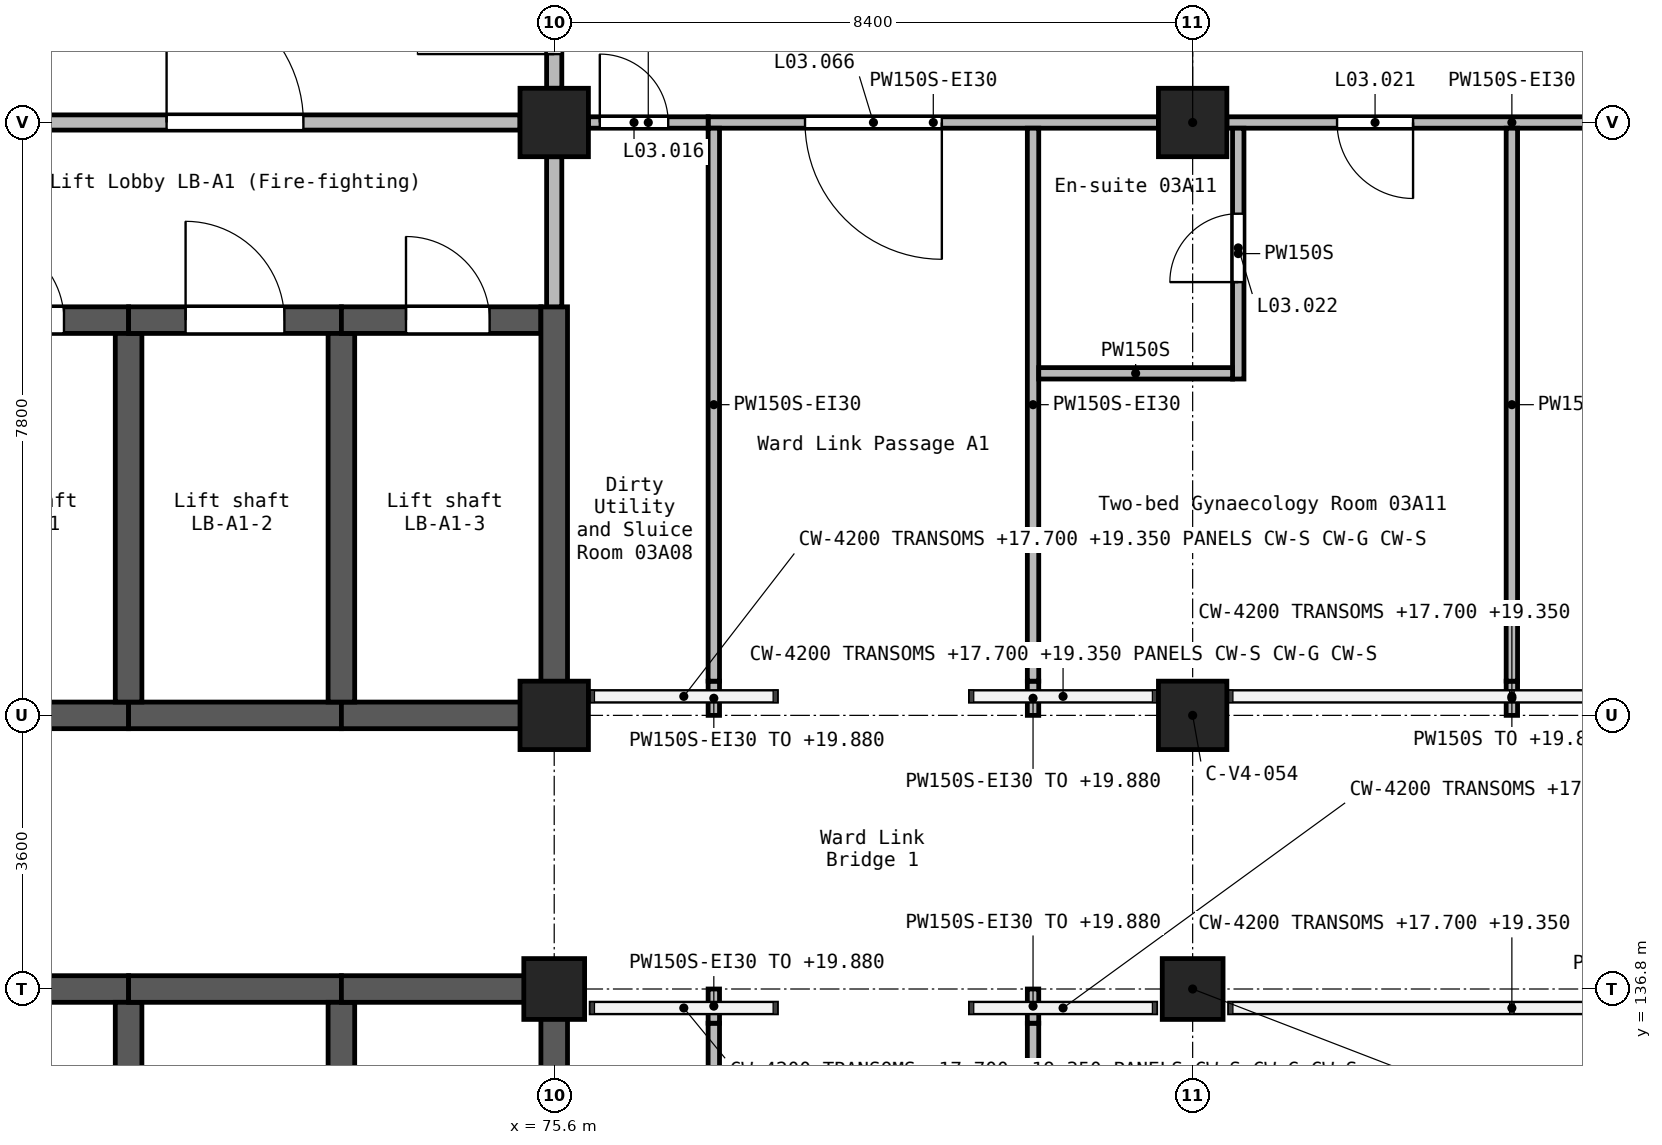
"""IFC4 building model, lengths in metres.
Left out: names, types, materials, properties, quantities, classifications, styles, units other than length and angle.
Written with IfcOpenShell. Run it as: python <this file> out.ifc"""

import sys

from ifc_helpers import new_model, si_unit, direction, frame, frame_2d, origin, origin_2d, place, context, subcontext, project, spatial, rectangle, extrude, element, fill, save


model = new_model("IFC4")
c1 = context("Model", 3, precision=1e-05, world=origin(), true_north=direction((0.0, 1.0)))
c2 = subcontext(c1, "Body", "Model", "MODEL_VIEW")
j1 = project(units=[si_unit("LENGTHUNIT", "METRE"), si_unit("PLANEANGLEUNIT", "RADIAN")], contexts=[c1])
p1 = place(None, origin())
s1 = spatial("IfcSite", under=j1, at=p1, CompositionType="ELEMENT")
p2 = place(p1, origin())
s2 = spatial("IfcBuilding", under=s1, at=p2, CompositionType="ELEMENT")
p3 = place(p2, frame((0.0, 0.0, 16.8)))
s3 = spatial("IfcBuildingStorey", under=s2, at=p3, CompositionType="ELEMENT", Elevation=16.8)
p4 = place(p3, frame((75.6, 136.8, 0.0), z_axis=(0.0, 0.0, 1.0), x_axis=(1.0, 0.0, 0.0)))
e1 = element("IfcColumn", 1, at=p4, inside=s3, PredefinedType="COLUMN", context=c2, shape_type="SweptSolid", body=[
    extrude(rectangle(XDim=0.8, YDim=0.8, at=origin_2d()), origin(), (0.0, 0.0, 1.0), 4.2),
])
for number, where, z_axis, x_axis in (
    (2, (75.6, 140.4, 0.0), (0.0, 0.0, 1.0), (1.0, 0.0, 0.0)),
    (3, (75.6, 148.2, 0.0), (0.0, 0.0, 1.0), (1.0, 0.0, 0.0)),
):
    element("IfcColumn", number, at=place(p3, frame(where, z_axis=z_axis, x_axis=x_axis)), inside=s3, PredefinedType="COLUMN", context=c2, shape_type="SweptSolid", body=[
        extrude(rectangle(XDim=0.9, YDim=0.9, at=origin_2d()), origin(), (0.0, 0.0, 1.0), 4.2),
    ])
p5 = place(p3, frame((84.0, 136.8, 0.0), z_axis=(0.0, 0.0, 1.0), x_axis=(1.0, 0.0, 0.0)))
e4 = element("IfcColumn", 4, at=p5, inside=s3, PredefinedType="COLUMN", context=c2, shape_type="SweptSolid", body=[
    extrude(rectangle(XDim=0.8, YDim=0.8, at=origin_2d()), origin(), (0.0, 0.0, 1.0), 4.2),
])
for number, where, z_axis, x_axis in (
    (5, (84.0, 140.4, 0.0), (0.0, 0.0, 1.0), (1.0, 0.0, 0.0)),
    (6, (84.0, 148.2, 0.0), (0.0, 0.0, 1.0), (1.0, 0.0, 0.0)),
):
    element("IfcColumn", number, at=place(p3, frame(where, z_axis=z_axis, x_axis=x_axis)), inside=s3, PredefinedType="COLUMN", context=c2, shape_type="SweptSolid", body=[
        extrude(rectangle(XDim=0.9, YDim=0.9, at=origin_2d()), origin(), (0.0, 0.0, 1.0), 4.2),
    ])
p6 = place(p3, frame((67.025, 136.8, 0.0), z_axis=(0.0, 0.0, 1.0), x_axis=(1.0, 0.0, 0.0)))
e7 = element("IfcWall", 7, at=p6, inside=s3, PredefinedType="SHEAR", context=c2, shape_type="SweptSolid", body=[
    extrude(rectangle(XDim=2.975, YDim=0.35, at=frame_2d((1.488, 0.0))), origin(), (0.0, 0.0, 1.0), 4.2),
])
p7 = place(p3, frame((67.025, 145.6, 0.0), z_axis=(0.0, 0.0, 1.0), x_axis=(1.0, 0.0, 0.0)))
e8 = element("IfcWall", 8, at=p7, inside=s3, PredefinedType="SHEAR", context=c2, shape_type="SweptSolid", body=[
    extrude(rectangle(XDim=2.975, YDim=0.35, at=frame_2d((1.488, 0.0))), origin(), (0.0, 0.0, 1.0), 4.2),
])
p8 = place(p7, frame((1.025, 0.0, 0.0)))
e9 = element("IfcOpeningElement", 9, at=p8, cuts=e8, PredefinedType="OPENING", context=c2, shape_type="SweptSolid", body=[
    extrude(rectangle(XDim=1.1, YDim=2.1, at=frame_2d((0.55, 1.05))), frame((0.0, 0.185, 0.0), z_axis=(0.0, -1.0, 0.0), x_axis=(1.0, 0.0, 0.0)), (0.0, 0.0, 1.0), 0.37),
])
p9 = place(p3, frame((67.375, 140.4, 0.0), z_axis=(0.0, 0.0, 1.0), x_axis=(1.0, 0.0, 0.0)))
e10 = element("IfcWall", 10, at=p9, inside=s3, PredefinedType="SHEAR", context=c2, shape_type="SweptSolid", body=[
    extrude(rectangle(XDim=2.625, YDim=0.35, at=frame_2d((1.312, 0.0))), origin(), (0.0, 0.0, 1.0), 4.2),
])
p10 = place(p3, frame((70.0, 131.775, 0.0), z_axis=(0.0, 0.0, 1.0), x_axis=(0.0, 1.0, 0.0)))
e11 = element("IfcWall", 11, at=p10, inside=s3, PredefinedType="SHEAR", context=c2, shape_type="SweptSolid", body=[
    extrude(rectangle(XDim=4.85, YDim=0.35, at=frame_2d((2.425, 0.0))), origin(), (0.0, 0.0, 1.0), 4.2),
])
for number, where, z_axis, x_axis in (
    (12, (70.0, 136.8, 0.0), (0.0, 0.0, 1.0), (1.0, 0.0, 0.0)),
    (13, (70.0, 140.4, 0.0), (0.0, 0.0, 1.0), (1.0, 0.0, 0.0)),
):
    element("IfcWall", number, at=place(p3, frame(where, z_axis=z_axis, x_axis=x_axis)), inside=s3, PredefinedType="SHEAR", context=c2, shape_type="SweptSolid", body=[
        extrude(rectangle(XDim=2.8, YDim=0.35, at=frame_2d((1.4, 0.0))), origin(), (0.0, 0.0, 1.0), 4.2),
    ])
p11 = place(p3, frame((70.0, 140.575, 0.0), z_axis=(0.0, 0.0, 1.0), x_axis=(0.0, 1.0, 0.0)))
e14 = element("IfcWall", 14, at=p11, inside=s3, PredefinedType="SHEAR", context=c2, shape_type="SweptSolid", body=[
    extrude(rectangle(XDim=4.85, YDim=0.35, at=frame_2d((2.425, 0.0))), origin(), (0.0, 0.0, 1.0), 4.2),
])
p12 = place(p3, frame((70.0, 145.6, 0.0), z_axis=(0.0, 0.0, 1.0), x_axis=(1.0, 0.0, 0.0)))
e15 = element("IfcWall", 15, at=p12, inside=s3, PredefinedType="SHEAR", context=c2, shape_type="SweptSolid", body=[
    extrude(rectangle(XDim=2.8, YDim=0.35, at=frame_2d((1.4, 0.0))), origin(), (0.0, 0.0, 1.0), 4.2),
])
p13 = place(p12, frame((0.75, 0.0, 0.0)))
e16 = element("IfcOpeningElement", 16, at=p13, cuts=e15, PredefinedType="OPENING", context=c2, shape_type="SweptSolid", body=[
    extrude(rectangle(XDim=1.3, YDim=2.1, at=frame_2d((0.65, 1.05))), frame((0.0, 0.185, 0.0), z_axis=(0.0, -1.0, 0.0), x_axis=(1.0, 0.0, 0.0)), (0.0, 0.0, 1.0), 0.37),
])
p14 = place(p3, frame((72.8, 131.775, 0.0), z_axis=(0.0, 0.0, 1.0), x_axis=(0.0, 1.0, 0.0)))
e17 = element("IfcWall", 17, at=p14, inside=s3, PredefinedType="SHEAR", context=c2, shape_type="SweptSolid", body=[
    extrude(rectangle(XDim=4.85, YDim=0.35, at=frame_2d((2.425, 0.0))), origin(), (0.0, 0.0, 1.0), 4.2),
])
for number, where, z_axis, x_axis in (
    (18, (72.8, 136.8, 0.0), (0.0, 0.0, 1.0), (1.0, 0.0, 0.0)),
    (19, (72.8, 140.4, 0.0), (0.0, 0.0, 1.0), (1.0, 0.0, 0.0)),
):
    element("IfcWall", number, at=place(p3, frame(where, z_axis=z_axis, x_axis=x_axis)), inside=s3, PredefinedType="SHEAR", context=c2, shape_type="SweptSolid", body=[
        extrude(rectangle(XDim=2.625, YDim=0.35, at=frame_2d((1.312, 0.0))), origin(), (0.0, 0.0, 1.0), 4.2),
    ])
p15 = place(p3, frame((72.8, 140.575, 0.0), z_axis=(0.0, 0.0, 1.0), x_axis=(0.0, 1.0, 0.0)))
e20 = element("IfcWall", 20, at=p15, inside=s3, PredefinedType="SHEAR", context=c2, shape_type="SweptSolid", body=[
    extrude(rectangle(XDim=4.85, YDim=0.35, at=frame_2d((2.425, 0.0))), origin(), (0.0, 0.0, 1.0), 4.2),
])
p16 = place(p3, frame((72.8, 145.6, 0.0), z_axis=(0.0, 0.0, 1.0), x_axis=(1.0, 0.0, 0.0)))
e21 = element("IfcWall", 21, at=p16, inside=s3, PredefinedType="SHEAR", context=c2, shape_type="SweptSolid", body=[
    extrude(rectangle(XDim=2.625, YDim=0.35, at=frame_2d((1.312, 0.0))), origin(), (0.0, 0.0, 1.0), 4.2),
])
p17 = place(p16, frame((0.85, 0.0, 0.0)))
e22 = element("IfcOpeningElement", 22, at=p17, cuts=e21, PredefinedType="OPENING", context=c2, shape_type="SweptSolid", body=[
    extrude(rectangle(XDim=1.1, YDim=2.1, at=frame_2d((0.55, 1.05))), frame((0.0, 0.185, 0.0), z_axis=(0.0, -1.0, 0.0), x_axis=(1.0, 0.0, 0.0)), (0.0, 0.0, 1.0), 0.37),
])
p18 = place(p3, frame((75.6, 131.425, 0.0), z_axis=(0.0, 0.0, 1.0), x_axis=(0.0, 1.0, 0.0)))
e23 = element("IfcWall", 23, at=p18, inside=s3, PredefinedType="SHEAR", context=c2, shape_type="SweptSolid", body=[
    extrude(rectangle(XDim=5.55, YDim=0.35, at=frame_2d((2.775, 0.0))), origin(), (0.0, 0.0, 1.0), 4.2),
])
p19 = place(p3, frame((75.6, 140.225, 0.0), z_axis=(0.0, 0.0, 1.0), x_axis=(0.0, 1.0, 0.0)))
e24 = element("IfcWall", 24, at=p19, inside=s3, PredefinedType="SHEAR", context=c2, shape_type="SweptSolid", body=[
    extrude(rectangle(XDim=5.55, YDim=0.35, at=frame_2d((2.775, 0.0))), origin(), (0.0, 0.0, 1.0), 4.2),
])
p20 = place(p3, frame((75.6, 145.775, 0.0), z_axis=(0.0, 0.0, 1.0), x_axis=(0.0, 1.0, 0.0)))
e25 = element("IfcWall", 25, at=p20, inside=s3, PredefinedType="SOLIDWALL", context=c2, shape_type="SweptSolid", body=[
    extrude(rectangle(XDim=1.975, YDim=0.2, at=frame_2d((0.988, 0.0))), origin(), (0.0, 0.0, 1.0), 3.9),
])
p21 = place(p3, frame((75.6, 148.65, 0.0), z_axis=(0.0, 0.0, 1.0), x_axis=(0.0, 1.0, 0.0)))
e26 = element("IfcWall", 26, at=p21, inside=s3, PredefinedType="SOLIDWALL", context=c2, shape_type="SweptSolid", body=[
    extrude(rectangle(XDim=2.7, YDim=0.2, at=frame_2d((1.35, 0.0))), origin(), (0.0, 0.0, 1.0), 3.9),
])
p22 = place(p21, frame((0.45, 0.0, 0.0)))
e27 = element("IfcOpeningElement", 27, at=p22, cuts=e26, PredefinedType="OPENING", context=c2, shape_type="SweptSolid", body=[
    extrude(rectangle(XDim=1.8, YDim=2.1, at=frame_2d((0.9, 1.05))), frame((0.0, 0.11, 0.0), z_axis=(0.0, -1.0, 0.0), x_axis=(1.0, 0.0, 0.0)), (0.0, 0.0, 1.0), 0.22),
])
p23 = place(p3, frame((67.65, 148.2, 0.0), z_axis=(0.0, 0.0, 1.0), x_axis=(1.0, 0.0, 0.0)))
e28 = element("IfcWall", 28, at=p23, inside=s3, PredefinedType="SOLIDWALL", context=c2, shape_type="SweptSolid", body=[
    extrude(rectangle(XDim=7.5, YDim=0.2, at=frame_2d((3.75, 0.0))), origin(), (0.0, 0.0, 1.0), 3.9),
])
p24 = place(p23, frame((2.85, 0.0, 0.0)))
e29 = element("IfcOpeningElement", 29, at=p24, cuts=e28, PredefinedType="OPENING", context=c2, shape_type="SweptSolid", body=[
    extrude(rectangle(XDim=1.8, YDim=2.1, at=frame_2d((0.9, 1.05))), frame((0.0, 0.11, 0.0), z_axis=(0.0, -1.0, 0.0), x_axis=(1.0, 0.0, 0.0)), (0.0, 0.0, 1.0), 0.22),
])
p25 = place(p3, frame((91.95, 148.2, 0.0), z_axis=(0.0, 0.0, 1.0), x_axis=(-1.0, 0.0, 0.0)))
e30 = element("IfcWall", 30, at=p25, inside=s3, PredefinedType="PARTITIONING", context=c2, shape_type="SweptSolid", body=[
    extrude(rectangle(XDim=7.5, YDim=0.15, at=frame_2d((3.75, 0.0))), origin(), (0.0, 0.0, 1.0), 3.9),
])
p26 = place(p25, frame((5.05, 0.0, 0.0)))
e31 = element("IfcOpeningElement", 31, at=p26, cuts=e30, PredefinedType="OPENING", context=c2, shape_type="SweptSolid", body=[
    extrude(rectangle(XDim=1.0, YDim=2.1, at=frame_2d((0.5, 1.05))), frame((0.0, 0.085, 0.0), z_axis=(0.0, -1.0, 0.0), x_axis=(1.0, 0.0, 0.0)), (0.0, 0.0, 1.0), 0.17),
])
p27 = place(p25, frame((0.1, 0.0, 0.0)))
e32 = element("IfcOpeningElement", 32, at=p27, cuts=e30, PredefinedType="OPENING", context=c2, shape_type="SweptSolid", body=[
    extrude(rectangle(XDim=1.8, YDim=2.1, at=frame_2d((0.9, 1.05))), frame((0.0, 0.085, 0.0), z_axis=(0.0, -1.0, 0.0), x_axis=(1.0, 0.0, 0.0)), (0.0, 0.0, 1.0), 0.17),
])
p28 = place(p3, frame((83.55, 148.2, 0.0), z_axis=(0.0, 0.0, 1.0), x_axis=(-1.0, 0.0, 0.0)))
e33 = element("IfcWall", 33, at=p28, inside=s3, PredefinedType="PARTITIONING", context=c2, shape_type="SweptSolid", body=[
    extrude(rectangle(XDim=5.925, YDim=0.15, at=frame_2d((2.962, 0.0))), origin(), (0.0, 0.0, 1.0), 3.9),
])
p29 = place(p28, frame((2.85, 0.0, 0.0)))
e34 = element("IfcOpeningElement", 34, at=p29, cuts=e33, PredefinedType="OPENING", context=c2, shape_type="SweptSolid", body=[
    extrude(rectangle(XDim=1.8, YDim=2.1, at=frame_2d((0.9, 1.05))), frame((0.0, 0.085, 0.0), z_axis=(0.0, -1.0, 0.0), x_axis=(1.0, 0.0, 0.0)), (0.0, 0.0, 1.0), 0.17),
])
p30 = place(p3, frame((77.7, 129.075, 0.0), z_axis=(0.0, 0.0, 1.0), x_axis=(0.0, 1.0, 0.0)))
e35 = element("IfcWall", 35, at=p30, inside=s3, PredefinedType="PARTITIONING", context=c2, shape_type="SweptSolid", body=[
    extrude(rectangle(XDim=7.275, YDim=0.15, at=frame_2d((3.638, 0.0))), origin(), (0.0, 0.0, 1.0), 3.9),
])
p31 = place(p3, frame((77.7, 136.35, 0.0), z_axis=(0.0, 0.0, 1.0), x_axis=(0.0, 1.0, 0.0)))
e36 = element("IfcWall", 36, at=p31, inside=s3, PredefinedType="PARTITIONING", context=c2, shape_type="SweptSolid", body=[
    extrude(rectangle(XDim=0.45, YDim=0.15, at=frame_2d((0.225, 0.0))), origin(), (0.0, 0.0, 1.0), 3.08),
])
p32 = place(p3, frame((81.9, 129.075, 0.0), z_axis=(0.0, 0.0, 1.0), x_axis=(0.0, 1.0, 0.0)))
e37 = element("IfcWall", 37, at=p32, inside=s3, PredefinedType="PARTITIONING", context=c2, shape_type="SweptSolid", body=[
    extrude(rectangle(XDim=7.275, YDim=0.15, at=frame_2d((3.638, 0.0))), origin(), (0.0, 0.0, 1.0), 3.9),
])
p33 = place(p3, frame((81.9, 136.35, 0.0), z_axis=(0.0, 0.0, 1.0), x_axis=(0.0, 1.0, 0.0)))
e38 = element("IfcWall", 38, at=p33, inside=s3, PredefinedType="PARTITIONING", context=c2, shape_type="SweptSolid", body=[
    extrude(rectangle(XDim=0.45, YDim=0.15, at=frame_2d((0.225, 0.0))), origin(), (0.0, 0.0, 1.0), 3.08),
])
p34 = place(p3, frame((77.7, 140.4, 0.0), z_axis=(0.0, 0.0, 1.0), x_axis=(0.0, 1.0, 0.0)))
e39 = element("IfcWall", 39, at=p34, inside=s3, PredefinedType="PARTITIONING", context=c2, shape_type="SweptSolid", body=[
    extrude(rectangle(XDim=0.45, YDim=0.15, at=frame_2d((0.225, 0.0))), origin(), (0.0, 0.0, 1.0), 3.08),
])
p35 = place(p3, frame((77.7, 140.85, 0.0), z_axis=(0.0, 0.0, 1.0), x_axis=(0.0, 1.0, 0.0)))
e40 = element("IfcWall", 40, at=p35, inside=s3, PredefinedType="PARTITIONING", context=c2, shape_type="SweptSolid", body=[
    extrude(rectangle(XDim=7.275, YDim=0.15, at=frame_2d((3.637, 0.0))), origin(), (0.0, 0.0, 1.0), 3.9),
])
p36 = place(p3, frame((81.9, 140.4, 0.0), z_axis=(0.0, 0.0, 1.0), x_axis=(0.0, 1.0, 0.0)))
e41 = element("IfcWall", 41, at=p36, inside=s3, PredefinedType="PARTITIONING", context=c2, shape_type="SweptSolid", body=[
    extrude(rectangle(XDim=0.45, YDim=0.15, at=frame_2d((0.225, 0.0))), origin(), (0.0, 0.0, 1.0), 3.08),
])
p37 = place(p3, frame((81.9, 140.85, 0.0), z_axis=(0.0, 0.0, 1.0), x_axis=(0.0, 1.0, 0.0)))
e42 = element("IfcWall", 42, at=p37, inside=s3, PredefinedType="PARTITIONING", context=c2, shape_type="SweptSolid", body=[
    extrude(rectangle(XDim=7.275, YDim=0.15, at=frame_2d((3.637, 0.0))), origin(), (0.0, 0.0, 1.0), 3.9),
])
p38 = place(p3, frame((76.05, 148.2, 0.0), z_axis=(0.0, 0.0, 1.0), x_axis=(1.0, 0.0, 0.0)))
e43 = element("IfcWall", 43, at=p38, inside=s3, PredefinedType="PARTITIONING", context=c2, shape_type="SweptSolid", body=[
    extrude(rectangle(XDim=1.575, YDim=0.15, at=frame_2d((0.788, 0.0))), origin(), (0.0, 0.0, 1.0), 3.9),
])
p39 = place(p38, frame((0.15, 0.0, 0.0)))
e44 = element("IfcOpeningElement", 44, at=p39, cuts=e43, PredefinedType="OPENING", context=c2, shape_type="SweptSolid", body=[
    extrude(rectangle(XDim=0.9, YDim=2.1, at=frame_2d((0.45, 1.05))), frame((0.0, 0.085, 0.0), z_axis=(0.0, -1.0, 0.0), x_axis=(1.0, 0.0, 0.0)), (0.0, 0.0, 1.0), 0.17),
])
p40 = place(p3, frame((88.2, 140.4, 0.0), z_axis=(0.0, 0.0, 1.0), x_axis=(0.0, 1.0, 0.0)))
e45 = element("IfcWall", 45, at=p40, inside=s3, PredefinedType="PARTITIONING", context=c2, shape_type="SweptSolid", body=[
    extrude(rectangle(XDim=0.45, YDim=0.15, at=frame_2d((0.225, 0.0))), origin(), (0.0, 0.0, 1.0), 3.08),
])
p41 = place(p3, frame((88.2, 140.85, 0.0), z_axis=(0.0, 0.0, 1.0), x_axis=(0.0, 1.0, 0.0)))
e46 = element("IfcWall", 46, at=p41, inside=s3, PredefinedType="PARTITIONING", context=c2, shape_type="SweptSolid", body=[
    extrude(rectangle(XDim=7.275, YDim=0.15, at=frame_2d((3.637, 0.0))), origin(), (0.0, 0.0, 1.0), 3.9),
])
p42 = place(p3, frame((84.6, 144.825, 0.0), z_axis=(0.0, 0.0, 1.0), x_axis=(0.0, 1.0, 0.0)))
e47 = element("IfcWall", 47, at=p42, inside=s3, PredefinedType="PARTITIONING", context=c2, shape_type="SweptSolid", body=[
    extrude(rectangle(XDim=3.3, YDim=0.15, at=frame_2d((1.65, 0.0))), origin(), (0.0, 0.0, 1.0), 3.9),
])
p43 = place(p42, frame((1.275, 0.0, 0.0)))
e48 = element("IfcOpeningElement", 48, at=p43, cuts=e47, PredefinedType="OPENING", context=c2, shape_type="SweptSolid", body=[
    extrude(rectangle(XDim=0.9, YDim=2.1, at=frame_2d((0.45, 1.05))), frame((0.0, 0.085, 0.0), z_axis=(0.0, -1.0, 0.0), x_axis=(1.0, 0.0, 0.0)), (0.0, 0.0, 1.0), 0.17),
])
p44 = place(p3, frame((81.975, 144.9, 0.0), z_axis=(0.0, 0.0, 1.0), x_axis=(1.0, 0.0, 0.0)))
e49 = element("IfcWall", 49, at=p44, inside=s3, PredefinedType="PARTITIONING", context=c2, shape_type="SweptSolid", body=[
    extrude(rectangle(XDim=2.55, YDim=0.15, at=frame_2d((1.275, 0.0))), origin(), (0.0, 0.0, 1.0), 3.9),
])
p45 = place(p22, frame((1.8, 0.0, 0.0), z_axis=(0.0, 0.0, 1.0), x_axis=(-1.0, 0.0, 0.0)))
e50 = element("IfcDoor", 50, at=p45, inside=s3, OperationType="DOUBLE_DOOR_SINGLE_SWING", PredefinedType="DOOR", context=c2, shape_type="SweptSolid", body=[
    extrude(rectangle(XDim=1.8, YDim=2.1, at=frame_2d((0.9, 1.05))), frame((0.0, 0.025, 0.0), z_axis=(0.0, -1.0, 0.0), x_axis=(1.0, 0.0, 0.0)), (0.0, 0.0, 1.0), 0.05),
])
fill(e27, e50)
p46 = place(p39, frame((0.9, 0.0, 0.0), z_axis=(0.0, 0.0, 1.0), x_axis=(-1.0, 0.0, 0.0)))
e51 = element("IfcDoor", 51, at=p46, inside=s3, OperationType="SINGLE_SWING_RIGHT", PredefinedType="DOOR", context=c2, shape_type="SweptSolid", body=[
    extrude(rectangle(XDim=0.9, YDim=2.1, at=frame_2d((0.45, 1.05))), frame((0.0, 0.025, 0.0), z_axis=(0.0, -1.0, 0.0), x_axis=(1.0, 0.0, 0.0)), (0.0, 0.0, 1.0), 0.05),
])
fill(e44, e51)
p47 = place(p26, origin())
e52 = element("IfcDoor", 52, at=p47, inside=s3, OperationType="SINGLE_SWING_RIGHT", PredefinedType="DOOR", context=c2, shape_type="SweptSolid", body=[
    extrude(rectangle(XDim=1.0, YDim=2.1, at=frame_2d((0.5, 1.05))), frame((0.0, 0.025, 0.0), z_axis=(0.0, -1.0, 0.0), x_axis=(1.0, 0.0, 0.0)), (0.0, 0.0, 1.0), 0.05),
])
fill(e31, e52)
p48 = place(p43, origin())
e53 = element("IfcDoor", 53, at=p48, inside=s3, OperationType="SINGLE_SWING_RIGHT", PredefinedType="DOOR", context=c2, shape_type="SweptSolid", body=[
    extrude(rectangle(XDim=0.9, YDim=2.1, at=frame_2d((0.45, 1.05))), frame((0.0, 0.025, 0.0), z_axis=(0.0, -1.0, 0.0), x_axis=(1.0, 0.0, 0.0)), (0.0, 0.0, 1.0), 0.05),
])
fill(e48, e53)
p49 = place(p29, origin())
e54 = element("IfcDoor", 54, at=p49, inside=s3, OperationType="DOUBLE_DOOR_SINGLE_SWING", PredefinedType="DOOR", context=c2, shape_type="SweptSolid", body=[
    extrude(rectangle(XDim=1.8, YDim=2.1, at=frame_2d((0.9, 1.05))), frame((0.0, 0.025, 0.0), z_axis=(0.0, -1.0, 0.0), x_axis=(1.0, 0.0, 0.0)), (0.0, 0.0, 1.0), 0.05),
])
fill(e34, e54)
p50 = place(p24, frame((1.8, 0.0, 0.0), z_axis=(0.0, 0.0, 1.0), x_axis=(-1.0, 0.0, 0.0)))
e55 = element("IfcDoor", 55, at=p50, inside=s3, OperationType="DOUBLE_DOOR_SINGLE_SWING", PredefinedType="DOOR", context=c2, shape_type="SweptSolid", body=[
    extrude(rectangle(XDim=1.8, YDim=2.1, at=frame_2d((0.9, 1.05))), frame((0.0, 0.025, 0.0), z_axis=(0.0, -1.0, 0.0), x_axis=(1.0, 0.0, 0.0)), (0.0, 0.0, 1.0), 0.05),
])
fill(e29, e55)
p51 = place(p8, origin())
e56 = element("IfcDoor", 56, at=p51, inside=s3, OperationType="DOUBLE_DOOR_SLIDING", PredefinedType="DOOR", context=c2, shape_type="SweptSolid", body=[
    extrude(rectangle(XDim=1.1, YDim=2.1, at=frame_2d((0.55, 1.05))), frame((0.0, 0.025, 0.0), z_axis=(0.0, -1.0, 0.0), x_axis=(1.0, 0.0, 0.0)), (0.0, 0.0, 1.0), 0.05),
])
fill(e9, e56)
p52 = place(p13, origin())
e57 = element("IfcDoor", 57, at=p52, inside=s3, OperationType="DOUBLE_DOOR_SLIDING", PredefinedType="DOOR", context=c2, shape_type="SweptSolid", body=[
    extrude(rectangle(XDim=1.3, YDim=2.1, at=frame_2d((0.65, 1.05))), frame((0.0, 0.025, 0.0), z_axis=(0.0, -1.0, 0.0), x_axis=(1.0, 0.0, 0.0)), (0.0, 0.0, 1.0), 0.05),
])
fill(e16, e57)
p53 = place(p17, origin())
e58 = element("IfcDoor", 58, at=p53, inside=s3, OperationType="DOUBLE_DOOR_SLIDING", PredefinedType="DOOR", context=c2, shape_type="SweptSolid", body=[
    extrude(rectangle(XDim=1.1, YDim=2.1, at=frame_2d((0.55, 1.05))), frame((0.0, 0.025, 0.0), z_axis=(0.0, -1.0, 0.0), x_axis=(1.0, 0.0, 0.0)), (0.0, 0.0, 1.0), 0.05),
])
fill(e22, e58)
save(model, sys.argv[1])
